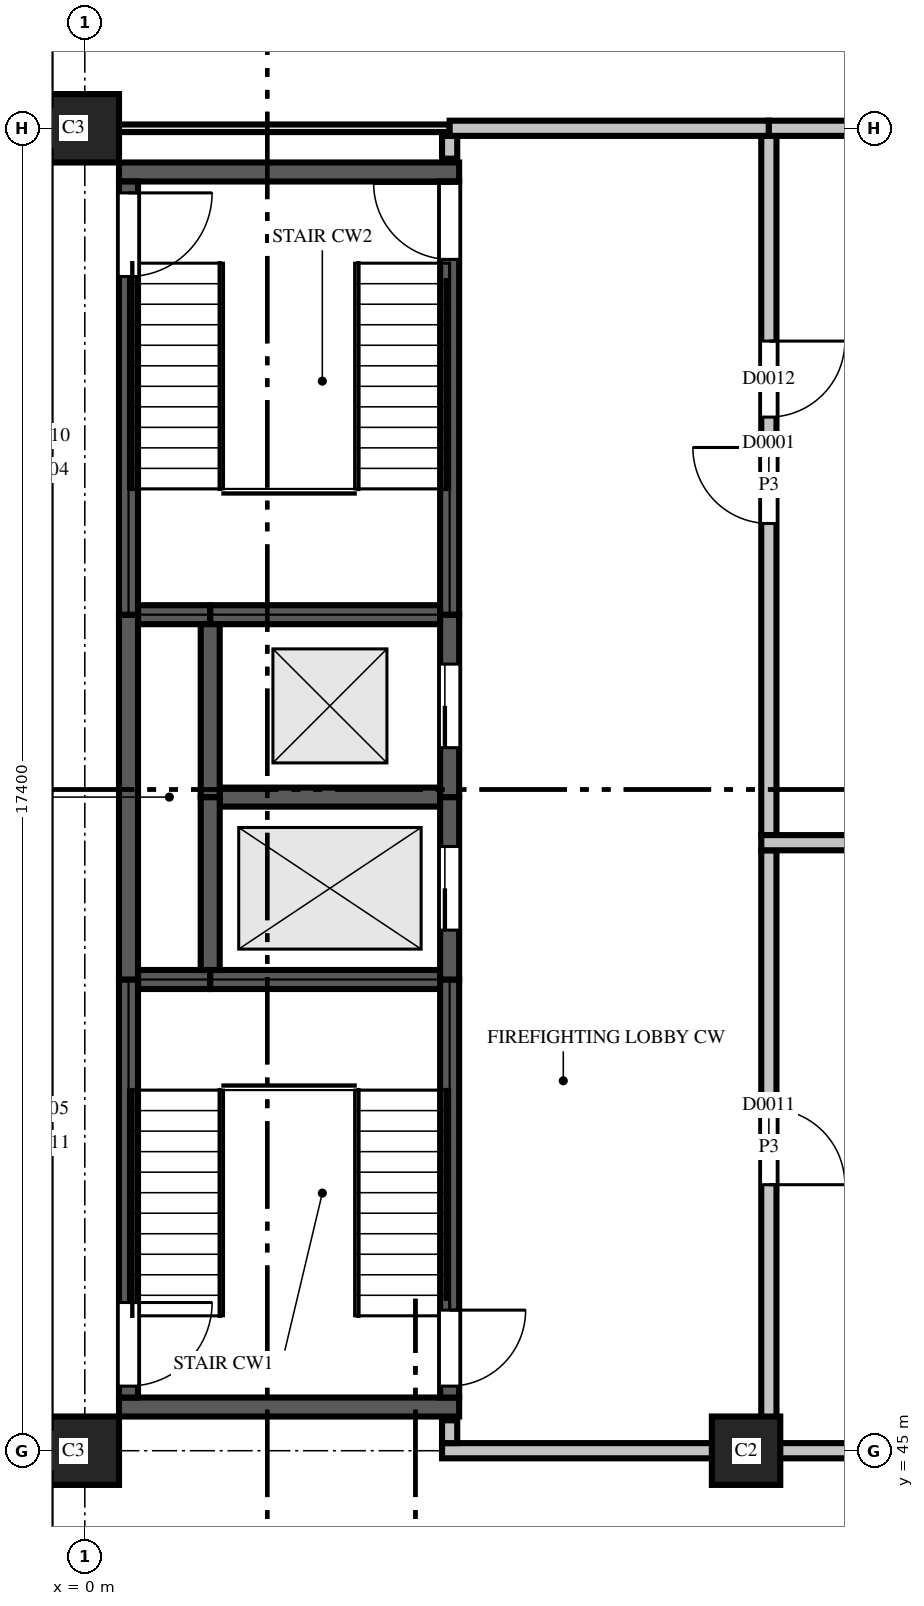
"""IFC4 building model, lengths in metres.
Left out: names, types, materials, properties, quantities, classifications, styles, units other than length and angle.
Written with IfcOpenShell. Run it as: python <this file> out.ifc"""

import sys

from ifc_helpers import new_model, si_unit, direction, frame, frame_2d, origin, place, context, subcontext, project, spatial, polyline, rectangle, outline, extrude, element, fill, save


model = new_model("IFC4")
c1 = context("Model", 3, precision=1e-05, world=origin(), true_north=direction((0.0, 1.0)))
c2 = subcontext(c1, "Body", "Model", "MODEL_VIEW")
j1 = project(units=[si_unit("LENGTHUNIT", "METRE"), si_unit("PLANEANGLEUNIT", "RADIAN")], contexts=[c1])
p1 = place(None, origin())
s1 = spatial("IfcSite", under=j1, at=p1, CompositionType="ELEMENT")
p2 = place(p1, origin())
s2 = spatial("IfcBuilding", under=s1, at=p2, CompositionType="ELEMENT")
p3 = place(p2, origin())
s3 = spatial("IfcBuildingStorey", under=s2, at=p3, CompositionType="ELEMENT", Elevation=0.0)
p4 = place(p3, frame((0.0, 45.0, 0.0), z_axis=(0.0, 0.0, 1.0), x_axis=(-1.0, 0.0, 0.0)))
e1 = element("IfcColumn", 1, at=p4, inside=s3, PredefinedType="COLUMN", context=c2, shape_type="SweptSolid", body=[
    extrude(outline(polyline([(-0.45, -0.45), (0.45, -0.45), (0.45, -0.3), (0.75, -0.3), (0.75, 0.3), (0.45, 0.3), (0.45, 0.45), (-0.45, 0.45), (-0.45, -0.45)])), origin(), (0.0, 0.0, 1.0), 4.5),
])
p5 = place(p3, frame((8.7, 45.0, 0.0), z_axis=(0.0, 0.0, 1.0), x_axis=(1.0, 0.0, 0.0)))
e2 = element("IfcColumn", 2, at=p5, inside=s3, PredefinedType="COLUMN", context=c2, shape_type="SweptSolid", body=[
    extrude(outline(polyline([(-0.45, -0.45), (0.45, -0.45), (0.45, 0.45), (-0.45, 0.45), (-0.45, -0.45)])), origin(), (0.0, 0.0, 1.0), 4.5),
])
p6 = place(p3, frame((0.0, 62.4, 0.0), z_axis=(0.0, 0.0, 1.0), x_axis=(-1.0, 0.0, 0.0)))
e3 = element("IfcColumn", 3, at=p6, inside=s3, PredefinedType="COLUMN", context=c2, shape_type="SweptSolid", body=[
    extrude(outline(polyline([(-0.45, -0.45), (0.45, -0.45), (0.45, -0.3), (0.75, -0.3), (0.75, 0.3), (0.45, 0.3), (0.45, 0.45), (-0.45, 0.45), (-0.45, -0.45)])), origin(), (0.0, 0.0, 1.0), 4.5),
])
p7 = place(p3, frame((0.45, 45.575, 0.0), z_axis=(0.0, 0.0, 1.0), x_axis=(1.0, 0.0, 0.0)))
e4 = element("IfcWall", 4, at=p7, inside=s3, PredefinedType="SHEAR", context=c2, shape_type="SweptSolid", body=[
    extrude(rectangle(XDim=4.475, YDim=0.25, at=frame_2d((2.238, 0.0))), origin(), (0.0, 0.0, 1.0), 4.5),
])
p8 = place(p3, frame((0.7, 51.2, 0.0), z_axis=(0.0, 0.0, 1.0), x_axis=(1.0, 0.0, 0.0)))
e5 = element("IfcWall", 5, at=p8, inside=s3, PredefinedType="SHEAR", context=c2, shape_type="SweptSolid", body=[
    extrude(rectangle(XDim=0.95, YDim=0.25, at=frame_2d((0.475, 0.0))), origin(), (0.0, 0.0, 1.0), 4.5),
])
p9 = place(p3, frame((1.65, 51.2, 0.0), z_axis=(0.0, 0.0, 1.0), x_axis=(1.0, 0.0, 0.0)))
e6 = element("IfcWall", 6, at=p9, inside=s3, PredefinedType="SHEAR", context=c2, shape_type="SweptSolid", body=[
    extrude(rectangle(XDim=3.025, YDim=0.25, at=frame_2d((1.513, 0.0))), origin(), (0.0, 0.0, 1.0), 4.5),
])
p10 = place(p3, frame((1.775, 53.6, -1.4), z_axis=(0.0, 0.0, 1.0), x_axis=(1.0, 0.0, 0.0)))
e7 = element("IfcWall", 7, at=p10, inside=s3, PredefinedType="SHEAR", context=c2, shape_type="SweptSolid", body=[
    extrude(rectangle(XDim=2.9, YDim=0.25, at=frame_2d((1.45, 0.0))), origin(), (0.0, 0.0, 1.0), 5.9),
])
p11 = place(p3, frame((0.7, 56.0, 0.0), z_axis=(0.0, 0.0, 1.0), x_axis=(1.0, 0.0, 0.0)))
e8 = element("IfcWall", 8, at=p11, inside=s3, PredefinedType="SHEAR", context=c2, shape_type="SweptSolid", body=[
    extrude(rectangle(XDim=0.95, YDim=0.25, at=frame_2d((0.475, 0.0))), origin(), (0.0, 0.0, 1.0), 4.5),
])
p12 = place(p3, frame((1.65, 56.0, 0.0), z_axis=(0.0, 0.0, 1.0), x_axis=(1.0, 0.0, 0.0)))
e9 = element("IfcWall", 9, at=p12, inside=s3, PredefinedType="SHEAR", context=c2, shape_type="SweptSolid", body=[
    extrude(rectangle(XDim=3.025, YDim=0.25, at=frame_2d((1.513, 0.0))), origin(), (0.0, 0.0, 1.0), 4.5),
])
p13 = place(p3, frame((0.45, 61.825, 0.0), z_axis=(0.0, 0.0, 1.0), x_axis=(1.0, 0.0, 0.0)))
e10 = element("IfcWall", 10, at=p13, inside=s3, PredefinedType="SHEAR", context=c2, shape_type="SweptSolid", body=[
    extrude(rectangle(XDim=4.475, YDim=0.25, at=frame_2d((2.238, 0.0))), origin(), (0.0, 0.0, 1.0), 4.5),
])
p14 = place(p3, frame((0.575, 45.7, 0.0), z_axis=(0.0, 0.0, 1.0), x_axis=(0.0, 1.0, 0.0)))
e11 = element("IfcWall", 11, at=p14, inside=s3, PredefinedType="SHEAR", context=c2, shape_type="SweptSolid", body=[
    extrude(rectangle(XDim=5.5, YDim=0.25, at=frame_2d((2.75, 0.0))), origin(), (0.0, 0.0, 1.0), 4.5),
])
p15 = place(p14, frame((0.15, 0.0, 0.0)))
e12 = element("IfcOpeningElement", 12, at=p15, cuts=e11, PredefinedType="OPENING", context=c2, shape_type="SweptSolid", body=[
    extrude(rectangle(XDim=1.1, YDim=2.1, at=frame_2d((0.55, 1.05))), frame((0.0, 0.135, 0.0), z_axis=(0.0, -1.0, 0.0), x_axis=(1.0, 0.0, 0.0)), (0.0, 0.0, 1.0), 0.27),
])
p16 = place(p3, frame((0.575, 51.2, 0.0), z_axis=(0.0, 0.0, 1.0), x_axis=(0.0, 1.0, 0.0)))
e13 = element("IfcWall", 13, at=p16, inside=s3, PredefinedType="SHEAR", context=c2, shape_type="SweptSolid", body=[
    extrude(rectangle(XDim=4.8, YDim=0.25, at=frame_2d((2.4, 0.0))), origin(), (0.0, 0.0, 1.0), 4.5),
])
p17 = place(p3, frame((0.575, 56.0, 0.0), z_axis=(0.0, 0.0, 1.0), x_axis=(0.0, 1.0, 0.0)))
e14 = element("IfcWall", 14, at=p17, inside=s3, PredefinedType="SHEAR", context=c2, shape_type="SweptSolid", body=[
    extrude(rectangle(XDim=5.7, YDim=0.25, at=frame_2d((2.85, 0.0))), origin(), (0.0, 0.0, 1.0), 4.5),
])
p18 = place(p17, frame((4.45, 0.0, 0.0)))
e15 = element("IfcOpeningElement", 15, at=p18, cuts=e14, PredefinedType="OPENING", context=c2, shape_type="SweptSolid", body=[
    extrude(rectangle(XDim=1.1, YDim=2.1, at=frame_2d((0.55, 1.05))), frame((0.0, 0.135, 0.0), z_axis=(0.0, -1.0, 0.0), x_axis=(1.0, 0.0, 0.0)), (0.0, 0.0, 1.0), 0.27),
])
p19 = place(p3, frame((1.65, 51.325, -1.4), z_axis=(0.0, 0.0, 1.0), x_axis=(0.0, 1.0, 0.0)))
e16 = element("IfcWall", 16, at=p19, inside=s3, PredefinedType="SHEAR", context=c2, shape_type="SweptSolid", body=[
    extrude(rectangle(XDim=2.275, YDim=0.25, at=frame_2d((1.138, 0.0))), origin(), (0.0, 0.0, 1.0), 5.9),
])
p20 = place(p3, frame((1.65, 53.6, -1.4), z_axis=(0.0, 0.0, 1.0), x_axis=(0.0, 1.0, 0.0)))
e17 = element("IfcWall", 17, at=p20, inside=s3, PredefinedType="SHEAR", context=c2, shape_type="SweptSolid", body=[
    extrude(rectangle(XDim=2.275, YDim=0.25, at=frame_2d((1.137, 0.0))), origin(), (0.0, 0.0, 1.0), 5.9),
])
p21 = place(p3, frame((4.8, 45.7, 0.0), z_axis=(0.0, 0.0, 1.0), x_axis=(0.0, 1.0, 0.0)))
e18 = element("IfcWall", 18, at=p21, inside=s3, PredefinedType="SHEAR", context=c2, shape_type="SweptSolid", body=[
    extrude(rectangle(XDim=5.5, YDim=0.25, at=frame_2d((2.75, 0.0))), origin(), (0.0, 0.0, 1.0), 4.5),
])
p22 = place(p21, frame((0.15, 0.0, 0.0)))
e19 = element("IfcOpeningElement", 19, at=p22, cuts=e18, PredefinedType="OPENING", context=c2, shape_type="SweptSolid", body=[
    extrude(rectangle(XDim=1.0, YDim=2.1, at=frame_2d((0.5, 1.05))), frame((0.0, 0.135, 0.0), z_axis=(0.0, -1.0, 0.0), x_axis=(1.0, 0.0, 0.0)), (0.0, 0.0, 1.0), 0.27),
])
p23 = place(p3, frame((4.8, 51.2, -1.4), z_axis=(0.0, 0.0, 1.0), x_axis=(0.0, 1.0, 0.0)))
e20 = element("IfcWall", 20, at=p23, inside=s3, PredefinedType="SHEAR", context=c2, shape_type="SweptSolid", body=[
    extrude(rectangle(XDim=2.4, YDim=0.25, at=frame_2d((1.2, 0.0))), origin(), (0.0, 0.0, 1.0), 5.9),
])
p24 = place(p23, frame((0.65, 0.0, 1.4)))
e21 = element("IfcOpeningElement", 21, at=p24, cuts=e20, PredefinedType="OPENING", context=c2, shape_type="SweptSolid", body=[
    extrude(rectangle(XDim=1.1, YDim=2.1, at=frame_2d((0.55, 1.05))), frame((0.0, 0.135, 0.0), z_axis=(0.0, -1.0, 0.0), x_axis=(1.0, 0.0, 0.0)), (0.0, 0.0, 1.0), 0.27),
])
p25 = place(p3, frame((4.8, 53.6, -1.4), z_axis=(0.0, 0.0, 1.0), x_axis=(0.0, 1.0, 0.0)))
e22 = element("IfcWall", 22, at=p25, inside=s3, PredefinedType="SHEAR", context=c2, shape_type="SweptSolid", body=[
    extrude(rectangle(XDim=2.4, YDim=0.25, at=frame_2d((1.2, 0.0))), origin(), (0.0, 0.0, 1.0), 5.9),
])
p26 = place(p25, frame((0.65, 0.0, 1.4)))
e23 = element("IfcOpeningElement", 23, at=p26, cuts=e22, PredefinedType="OPENING", context=c2, shape_type="SweptSolid", body=[
    extrude(rectangle(XDim=1.1, YDim=2.1, at=frame_2d((0.55, 1.05))), frame((0.0, 0.135, 0.0), z_axis=(0.0, -1.0, 0.0), x_axis=(1.0, 0.0, 0.0)), (0.0, 0.0, 1.0), 0.27),
])
p27 = place(p3, frame((4.8, 56.0, 0.0), z_axis=(0.0, 0.0, 1.0), x_axis=(0.0, 1.0, 0.0)))
e24 = element("IfcWall", 24, at=p27, inside=s3, PredefinedType="SHEAR", context=c2, shape_type="SweptSolid", body=[
    extrude(rectangle(XDim=5.7, YDim=0.25, at=frame_2d((2.85, 0.0))), origin(), (0.0, 0.0, 1.0), 4.5),
])
p28 = place(p27, frame((4.675, 0.0, 0.0)))
e25 = element("IfcOpeningElement", 25, at=p28, cuts=e24, PredefinedType="OPENING", context=c2, shape_type="SweptSolid", body=[
    extrude(rectangle(XDim=1.0, YDim=2.1, at=frame_2d((0.5, 1.05))), frame((0.0, 0.135, 0.0), z_axis=(0.0, -1.0, 0.0), x_axis=(1.0, 0.0, 0.0)), (0.0, 0.0, 1.0), 0.27),
])
p29 = place(p3, frame((4.7, 45.0, 0.0), z_axis=(0.0, 0.0, 1.0), x_axis=(1.0, 0.0, 0.0)))
e26 = element("IfcWall", 26, at=p29, inside=s3, PredefinedType="PARTITIONING", context=c2, shape_type="SweptSolid", body=[
    extrude(rectangle(XDim=4.3, YDim=0.2, at=frame_2d((2.15, 0.0))), origin(), (0.0, 0.0, 1.0), 3.68),
])
p30 = place(p3, frame((9.0, 45.0, 0.0), z_axis=(0.0, 0.0, 1.0), x_axis=(1.0, 0.0, 0.0)))
e27 = element("IfcWall", 27, at=p30, inside=s3, PredefinedType="PARTITIONING", context=c2, shape_type="SweptSolid", body=[
    extrude(rectangle(XDim=8.34, YDim=0.2, at=frame_2d((4.17, 0.0))), origin(), (0.0, 0.0, 1.0), 3.68),
])
p31 = place(p3, frame((9.0, 45.1, 0.0), z_axis=(0.0, 0.0, 1.0), x_axis=(0.0, 1.0, 0.0)))
e28 = element("IfcWall", 28, at=p31, inside=s3, PredefinedType="PARTITIONING", context=c2, shape_type="SweptSolid", body=[
    extrude(rectangle(XDim=7.8, YDim=0.2, at=frame_2d((3.9, 0.0))), origin(), (0.0, 0.0, 1.0), 3.68),
])
p32 = place(p31, frame((3.4, 0.0, 0.0)))
e29 = element("IfcOpeningElement", 29, at=p32, cuts=e28, PredefinedType="OPENING", context=c2, shape_type="SweptSolid", body=[
    extrude(rectangle(XDim=1.0, YDim=2.1, at=frame_2d((0.5, 1.05))), frame((0.0, 0.11, 0.0), z_axis=(0.0, -1.0, 0.0), x_axis=(1.0, 0.0, 0.0)), (0.0, 0.0, 1.0), 0.22),
])
p33 = place(p3, frame((4.8, 45.4, 0.0), z_axis=(0.0, 0.0, 1.0), x_axis=(0.0, -1.0, 0.0)))
e30 = element("IfcWall", 30, at=p33, inside=s3, PredefinedType="PARTITIONING", context=c2, shape_type="SweptSolid", body=[
    extrude(rectangle(XDim=0.3, YDim=0.2, at=frame_2d((0.15, 0.0))), origin(), (0.0, 0.0, 1.0), 3.68),
])
p34 = place(p3, frame((9.0, 53.1, 0.0), z_axis=(0.0, 0.0, 1.0), x_axis=(0.0, 1.0, 0.0)))
e31 = element("IfcWall", 31, at=p34, inside=s3, PredefinedType="PARTITIONING", context=c2, shape_type="SweptSolid", body=[
    extrude(rectangle(XDim=9.2, YDim=0.2, at=frame_2d((4.6, 0.0))), origin(), (0.0, 0.0, 1.0), 3.68),
])
p35 = place(p34, frame((4.1, 0.0, 0.0)))
e32 = element("IfcOpeningElement", 32, at=p35, cuts=e31, PredefinedType="OPENING", context=c2, shape_type="SweptSolid", body=[
    extrude(rectangle(XDim=1.0, YDim=2.1, at=frame_2d((0.5, 1.05))), frame((0.0, 0.11, 0.0), z_axis=(0.0, -1.0, 0.0), x_axis=(1.0, 0.0, 0.0)), (0.0, 0.0, 1.0), 0.22),
])
p36 = place(p34, frame((5.5, 0.0, 0.0)))
e33 = element("IfcOpeningElement", 33, at=p36, cuts=e31, PredefinedType="OPENING", context=c2, shape_type="SweptSolid", body=[
    extrude(rectangle(XDim=1.0, YDim=2.1, at=frame_2d((0.5, 1.05))), frame((0.0, 0.11, 0.0), z_axis=(0.0, -1.0, 0.0), x_axis=(1.0, 0.0, 0.0)), (0.0, 0.0, 1.0), 0.22),
])
p37 = place(p3, frame((17.5, 53.0, 0.0), z_axis=(0.0, 0.0, 1.0), x_axis=(-1.0, 0.0, 0.0)))
e34 = element("IfcWall", 34, at=p37, inside=s3, PredefinedType="PARTITIONING", context=c2, shape_type="SweptSolid", body=[
    extrude(rectangle(XDim=8.6, YDim=0.2, at=frame_2d((4.3, 0.0))), origin(), (0.0, 0.0, 1.0), 3.68),
])
p38 = place(p3, frame((0.06, 62.4, 0.0), z_axis=(0.0, 0.0, 1.0), x_axis=(1.0, 0.0, 0.0)))
e35 = element("IfcWall", 35, at=p38, inside=s3, PredefinedType="PARTITIONING", context=c2, shape_type="SweptSolid", body=[
    extrude(rectangle(XDim=4.74, YDim=0.1, at=frame_2d((2.37, 0.0))), origin(), (0.0, 0.0, 1.0), 3.68),
])
p39 = place(p3, frame((4.8, 62.3, 0.0), z_axis=(0.0, 0.0, 1.0), x_axis=(0.0, -1.0, 0.0)))
e36 = element("IfcWall", 36, at=p39, inside=s3, PredefinedType="PARTITIONING", context=c2, shape_type="SweptSolid", body=[
    extrude(rectangle(XDim=0.3, YDim=0.2, at=frame_2d((0.15, 0.0))), origin(), (0.0, 0.0, 1.0), 3.68),
])
p40 = place(p3, frame((9.0, 62.4, 0.0), z_axis=(0.0, 0.0, 1.0), x_axis=(-1.0, 0.0, 0.0)))
e37 = element("IfcWall", 37, at=p40, inside=s3, PredefinedType="PARTITIONING", context=c2, shape_type="SweptSolid", body=[
    extrude(rectangle(XDim=4.2, YDim=0.2, at=frame_2d((2.1, 0.0))), origin(), (0.0, 0.0, 1.0), 3.68),
])
p41 = place(p3, frame((15.0, 62.4, 0.0), z_axis=(0.0, 0.0, 1.0), x_axis=(-1.0, 0.0, 0.0)))
e38 = element("IfcWall", 38, at=p41, inside=s3, PredefinedType="PARTITIONING", context=c2, shape_type="SweptSolid", body=[
    extrude(rectangle(XDim=6.0, YDim=0.2, at=frame_2d((3.0, 0.0))), origin(), (0.0, 0.0, 1.0), 3.68),
])
p42 = place(p15, origin())
e39 = element("IfcDoor", 39, at=p42, inside=s3, OperationType="SINGLE_SWING_RIGHT", PredefinedType="DOOR", context=c2, shape_type="SweptSolid", body=[
    extrude(rectangle(XDim=1.1, YDim=2.1, at=frame_2d((0.55, 1.05))), frame((0.0, 0.025, 0.0), z_axis=(0.0, -1.0, 0.0), x_axis=(1.0, 0.0, 0.0)), (0.0, 0.0, 1.0), 0.05),
])
fill(e12, e39)
p43 = place(p18, origin())
e40 = element("IfcDoor", 40, at=p43, inside=s3, OperationType="SINGLE_SWING_RIGHT", PredefinedType="DOOR", context=c2, shape_type="SweptSolid", body=[
    extrude(rectangle(XDim=1.1, YDim=2.1, at=frame_2d((0.55, 1.05))), frame((0.0, 0.025, 0.0), z_axis=(0.0, -1.0, 0.0), x_axis=(1.0, 0.0, 0.0)), (0.0, 0.0, 1.0), 0.05),
])
fill(e15, e40)
p44 = place(p35, origin())
e41 = element("IfcDoor", 41, at=p44, inside=s3, OperationType="SINGLE_SWING_LEFT", PredefinedType="DOOR", context=c2, shape_type="SweptSolid", body=[
    extrude(rectangle(XDim=1.0, YDim=2.1, at=frame_2d((0.5, 1.05))), frame((0.0, 0.025, 0.0), z_axis=(0.0, -1.0, 0.0), x_axis=(1.0, 0.0, 0.0)), (0.0, 0.0, 1.0), 0.05),
])
fill(e32, e41)
p45 = place(p32, origin())
e42 = element("IfcDoor", 42, at=p45, inside=s3, OperationType="SINGLE_SWING_LEFT", PredefinedType="DOOR", context=c2, shape_type="SweptSolid", body=[
    extrude(rectangle(XDim=1.0, YDim=2.1, at=frame_2d((0.5, 1.05))), frame((0.0, 0.025, 0.0), z_axis=(0.0, -1.0, 0.0), x_axis=(1.0, 0.0, 0.0)), (0.0, 0.0, 1.0), 0.05),
])
fill(e29, e42)
p46 = place(p36, origin())
e43 = element("IfcDoor", 43, at=p46, inside=s3, OperationType="SINGLE_SWING_RIGHT", PredefinedType="DOOR", context=c2, shape_type="SweptSolid", body=[
    extrude(rectangle(XDim=1.0, YDim=2.1, at=frame_2d((0.5, 1.05))), frame((0.0, 0.025, 0.0), z_axis=(0.0, -1.0, 0.0), x_axis=(1.0, 0.0, 0.0)), (0.0, 0.0, 1.0), 0.05),
])
fill(e33, e43)
p47 = place(p24, origin())
e44 = element("IfcDoor", 44, at=p47, inside=s3, OperationType="SLIDING_TO_LEFT", PredefinedType="DOOR", context=c2, shape_type="SweptSolid", body=[
    extrude(rectangle(XDim=1.1, YDim=2.1, at=frame_2d((0.55, 1.05))), frame((0.0, 0.025, 0.0), z_axis=(0.0, -1.0, 0.0), x_axis=(1.0, 0.0, 0.0)), (0.0, 0.0, 1.0), 0.05),
])
fill(e21, e44)
p48 = place(p26, origin())
e45 = element("IfcDoor", 45, at=p48, inside=s3, OperationType="SLIDING_TO_LEFT", PredefinedType="DOOR", context=c2, shape_type="SweptSolid", body=[
    extrude(rectangle(XDim=1.1, YDim=2.1, at=frame_2d((0.55, 1.05))), frame((0.0, 0.025, 0.0), z_axis=(0.0, -1.0, 0.0), x_axis=(1.0, 0.0, 0.0)), (0.0, 0.0, 1.0), 0.05),
])
fill(e23, e45)
p49 = place(p28, origin())
e46 = element("IfcDoor", 46, at=p49, inside=s3, OperationType="SINGLE_SWING_LEFT", PredefinedType="DOOR", context=c2, shape_type="SweptSolid", body=[
    extrude(rectangle(XDim=1.0, YDim=2.1, at=frame_2d((0.5, 1.05))), frame((0.0, 0.025, 0.0), z_axis=(0.0, -1.0, 0.0), x_axis=(1.0, 0.0, 0.0)), (0.0, 0.0, 1.0), 0.05),
])
fill(e25, e46)
p50 = place(p22, origin())
e47 = element("IfcDoor", 47, at=p50, inside=s3, OperationType="SINGLE_SWING_RIGHT", PredefinedType="DOOR", context=c2, shape_type="SweptSolid", body=[
    extrude(rectangle(XDim=1.0, YDim=2.1, at=frame_2d((0.5, 1.05))), frame((0.0, 0.025, 0.0), z_axis=(0.0, -1.0, 0.0), x_axis=(1.0, 0.0, 0.0)), (0.0, 0.0, 1.0), 0.05),
])
fill(e19, e47)
save(model, sys.argv[1])
